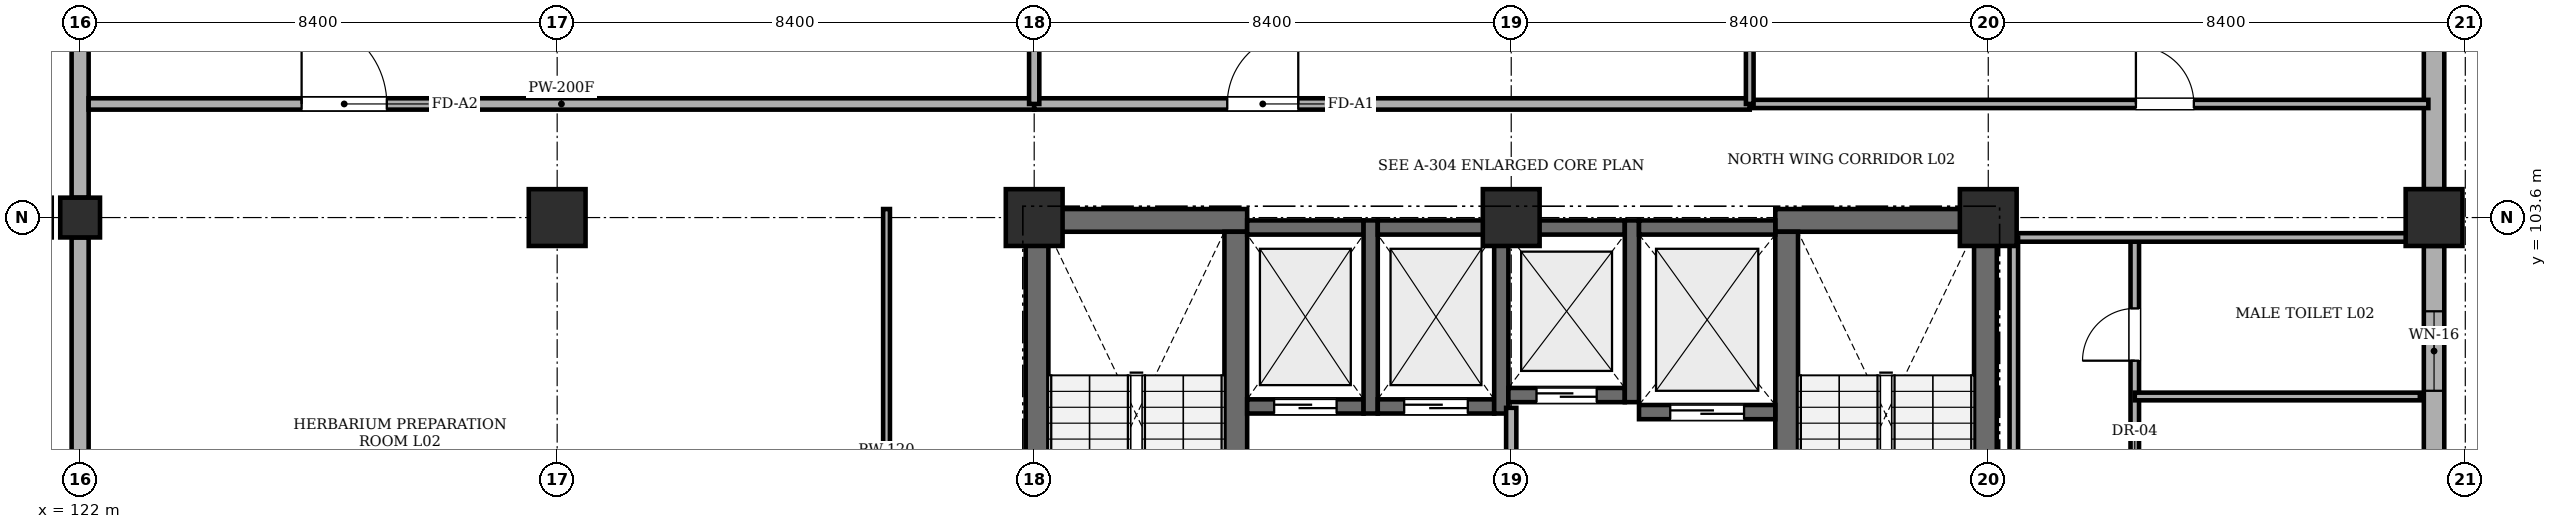
"""IFC4 building model, lengths in metres.
Left out: names, types, materials, properties, quantities, classifications, styles, units other than length and angle.
Written with IfcOpenShell. Run it as: python <this file> out.ifc"""

import sys

from ifc_helpers import new_model, si_unit, direction, frame, frame_2d, origin, origin_2d, place, context, subcontext, project, spatial, rectangle, extrude, element, fill, save


model = new_model("IFC4")
c1 = context("Model", 3, precision=1e-05, world=origin(), true_north=direction((0.0, 1.0)))
c2 = subcontext(c1, "Body", "Model", "MODEL_VIEW")
j1 = project(units=[si_unit("LENGTHUNIT", "METRE"), si_unit("PLANEANGLEUNIT", "RADIAN")], contexts=[c1])
p1 = place(None, origin())
s1 = spatial("IfcSite", under=j1, at=p1, CompositionType="ELEMENT")
p2 = place(p1, origin())
s2 = spatial("IfcBuilding", under=s1, at=p2, CompositionType="ELEMENT")
p3 = place(p2, frame((0.0, 0.0, 5.4)))
s3 = spatial("IfcBuildingStorey", under=s2, at=p3, CompositionType="ELEMENT", Elevation=5.4)
p4 = place(p3, frame((122.0, 103.6, 0.0), z_axis=(0.0, 0.0, 1.0), x_axis=(1.0, 0.0, 0.0)))
e1 = element("IfcColumn", 1, at=p4, inside=s3, PredefinedType="COLUMN", context=c2, shape_type="SweptSolid", body=[
    extrude(rectangle(XDim=0.7, YDim=0.7, at=origin_2d()), origin(), (0.0, 0.0, 1.0), 4.58),
])
for number, where, z_axis, x_axis in (
    (2, (130.4, 103.6, 0.0), (0.0, 0.0, 1.0), (1.0, 0.0, 0.0)),
    (3, (138.8, 103.6, 0.0), (0.0, 0.0, 1.0), (1.0, 0.0, 0.0)),
    (4, (147.2, 103.6, 0.0), (0.0, 0.0, 1.0), (1.0, 0.0, 0.0)),
    (5, (155.6, 103.6, 0.0), (0.0, 0.0, 1.0), (1.0, 0.0, 0.0)),
    (6, (163.45, 103.6, 0.0), (0.0, 0.0, 1.0), (1.0, 0.0, 0.0)),
):
    element("IfcColumn", number, at=place(p3, frame(where, z_axis=z_axis, x_axis=x_axis)), inside=s3, PredefinedType="COLUMN", context=c2, shape_type="SweptSolid", body=[
        extrude(rectangle(XDim=1.0, YDim=1.0, at=origin_2d()), origin(), (0.0, 0.0, 1.0), 4.58),
    ])
p5 = place(p3, frame((138.65, 103.55, 0.0), z_axis=(0.0, 0.0, 1.0), x_axis=(1.0, 0.0, 0.0)))
e7 = element("IfcWall", 7, at=p5, inside=s3, PredefinedType="SHEAR", context=c2, shape_type="SweptSolid", body=[
    extrude(rectangle(XDim=3.9, YDim=0.4, at=frame_2d((1.95, 0.0))), origin(), (0.0, 0.0, 1.0), 4.58),
])
p6 = place(p3, frame((138.85, 95.45, 0.0), z_axis=(0.0, 0.0, 1.0), x_axis=(0.0, 1.0, 0.0)))
e8 = element("IfcWall", 8, at=p6, inside=s3, PredefinedType="SHEAR", context=c2, shape_type="SweptSolid", body=[
    extrude(rectangle(XDim=7.9, YDim=0.4, at=frame_2d((3.95, 0.0))), origin(), (0.0, 0.0, 1.0), 4.58),
])
p7 = place(p3, frame((142.35, 95.45, 0.0), z_axis=(0.0, 0.0, 1.0), x_axis=(0.0, 1.0, 0.0)))
e9 = element("IfcWall", 9, at=p7, inside=s3, PredefinedType="SHEAR", context=c2, shape_type="SweptSolid", body=[
    extrude(rectangle(XDim=7.9, YDim=0.4, at=frame_2d((3.95, 0.0))), origin(), (0.0, 0.0, 1.0), 4.58),
])
p8 = place(p7, frame((0.22, 0.0, 0.0)))
e10 = element("IfcOpeningElement", 10, at=p8, cuts=e9, PredefinedType="OPENING", context=c2, shape_type="SweptSolid", body=[
    extrude(rectangle(XDim=1.15, YDim=2.15, at=frame_2d((0.575, 1.075))), frame((0.0, 0.21, 0.0), z_axis=(0.0, -1.0, 0.0), x_axis=(1.0, 0.0, 0.0)), (0.0, 0.0, 1.0), 0.42),
])
p9 = place(p3, frame((151.85, 103.55, 0.0), z_axis=(0.0, 0.0, 1.0), x_axis=(1.0, 0.0, 0.0)))
e11 = element("IfcWall", 11, at=p9, inside=s3, PredefinedType="SHEAR", context=c2, shape_type="SweptSolid", body=[
    extrude(rectangle(XDim=3.9, YDim=0.4, at=frame_2d((1.95, 0.0))), origin(), (0.0, 0.0, 1.0), 4.58),
])
p10 = place(p3, frame((152.05, 95.45, 0.0), z_axis=(0.0, 0.0, 1.0), x_axis=(0.0, 1.0, 0.0)))
e12 = element("IfcWall", 12, at=p10, inside=s3, PredefinedType="SHEAR", context=c2, shape_type="SweptSolid", body=[
    extrude(rectangle(XDim=7.9, YDim=0.4, at=frame_2d((3.95, 0.0))), origin(), (0.0, 0.0, 1.0), 4.58),
])
p11 = place(p10, frame((0.35, 0.0, 0.0)))
e13 = element("IfcOpeningElement", 13, at=p11, cuts=e12, PredefinedType="OPENING", context=c2, shape_type="SweptSolid", body=[
    extrude(rectangle(XDim=1.15, YDim=2.15, at=frame_2d((0.575, 1.075))), frame((0.0, 0.21, 0.0), z_axis=(0.0, -1.0, 0.0), x_axis=(1.0, 0.0, 0.0)), (0.0, 0.0, 1.0), 0.42),
])
p12 = place(p3, frame((155.55, 95.45, 0.0), z_axis=(0.0, 0.0, 1.0), x_axis=(0.0, 1.0, 0.0)))
e14 = element("IfcWall", 14, at=p12, inside=s3, PredefinedType="SHEAR", context=c2, shape_type="SweptSolid", body=[
    extrude(rectangle(XDim=7.9, YDim=0.4, at=frame_2d((3.95, 0.0))), origin(), (0.0, 0.0, 1.0), 4.58),
])
p13 = place(p3, frame((142.55, 100.275, 0.0), z_axis=(0.0, 0.0, 1.0), x_axis=(1.0, 0.0, 0.0)))
e15 = element("IfcWall", 15, at=p13, inside=s3, PredefinedType="SHEAR", context=c2, shape_type="SweptSolid", body=[
    extrude(rectangle(XDim=2.05, YDim=0.25, at=frame_2d((1.025, 0.0))), origin(), (0.0, 0.0, 1.0), 4.58),
])
p14 = place(p13, frame((0.475, 0.0, 0.0)))
e16 = element("IfcOpeningElement", 16, at=p14, cuts=e15, PredefinedType="OPENING", context=c2, shape_type="SweptSolid", body=[
    extrude(rectangle(XDim=1.1, YDim=2.15, at=frame_2d((0.55, 1.075))), frame((0.0, 0.135, 0.0), z_axis=(0.0, -1.0, 0.0), x_axis=(1.0, 0.0, 0.0)), (0.0, 0.0, 1.0), 0.27),
])
p15 = place(p3, frame((142.55, 103.425, 0.0), z_axis=(0.0, 0.0, 1.0), x_axis=(1.0, 0.0, 0.0)))
e17 = element("IfcWall", 17, at=p15, inside=s3, PredefinedType="SHEAR", context=c2, shape_type="SweptSolid", body=[
    extrude(rectangle(XDim=2.05, YDim=0.25, at=frame_2d((1.025, 0.0))), origin(), (0.0, 0.0, 1.0), 4.58),
])
p16 = place(p3, frame((144.725, 100.15, 0.0), z_axis=(0.0, 0.0, 1.0), x_axis=(0.0, 1.0, 0.0)))
e18 = element("IfcWall", 18, at=p16, inside=s3, PredefinedType="SHEAR", context=c2, shape_type="SweptSolid", body=[
    extrude(rectangle(XDim=3.4, YDim=0.25, at=frame_2d((1.7, 0.0))), origin(), (0.0, 0.0, 1.0), 4.58),
])
p17 = place(p3, frame((144.85, 100.275, 0.0), z_axis=(0.0, 0.0, 1.0), x_axis=(1.0, 0.0, 0.0)))
e19 = element("IfcWall", 19, at=p17, inside=s3, PredefinedType="SHEAR", context=c2, shape_type="SweptSolid", body=[
    extrude(rectangle(XDim=2.05, YDim=0.25, at=frame_2d((1.025, 0.0))), origin(), (0.0, 0.0, 1.0), 4.58),
])
p18 = place(p17, frame((0.465, 0.0, 0.0)))
e20 = element("IfcOpeningElement", 20, at=p18, cuts=e19, PredefinedType="OPENING", context=c2, shape_type="SweptSolid", body=[
    extrude(rectangle(XDim=1.12, YDim=2.15, at=frame_2d((0.56, 1.075))), frame((0.0, 0.135, 0.0), z_axis=(0.0, -1.0, 0.0), x_axis=(1.0, 0.0, 0.0)), (0.0, 0.0, 1.0), 0.27),
])
p19 = place(p3, frame((144.85, 103.425, 0.0), z_axis=(0.0, 0.0, 1.0), x_axis=(1.0, 0.0, 0.0)))
e21 = element("IfcWall", 21, at=p19, inside=s3, PredefinedType="SHEAR", context=c2, shape_type="SweptSolid", body=[
    extrude(rectangle(XDim=2.05, YDim=0.25, at=frame_2d((1.025, 0.0))), origin(), (0.0, 0.0, 1.0), 4.58),
])
p20 = place(p3, frame((147.025, 100.15, 0.0), z_axis=(0.0, 0.0, 1.0), x_axis=(0.0, 1.0, 0.0)))
e22 = element("IfcWall", 22, at=p20, inside=s3, PredefinedType="SHEAR", context=c2, shape_type="SweptSolid", body=[
    extrude(rectangle(XDim=3.4, YDim=0.25, at=frame_2d((1.7, 0.0))), origin(), (0.0, 0.0, 1.0), 4.58),
])
p21 = place(p3, frame((147.15, 100.475, 0.0), z_axis=(0.0, 0.0, 1.0), x_axis=(1.0, 0.0, 0.0)))
e23 = element("IfcWall", 23, at=p21, inside=s3, PredefinedType="SHEAR", context=c2, shape_type="SweptSolid", body=[
    extrude(rectangle(XDim=2.05, YDim=0.25, at=frame_2d((1.025, 0.0))), origin(), (0.0, 0.0, 1.0), 4.58),
])
p22 = place(p21, frame((0.495, 0.0, 0.0)))
e24 = element("IfcOpeningElement", 24, at=p22, cuts=e23, PredefinedType="OPENING", context=c2, shape_type="SweptSolid", body=[
    extrude(rectangle(XDim=1.06, YDim=2.15, at=frame_2d((0.53, 1.075))), frame((0.0, 0.135, 0.0), z_axis=(0.0, -1.0, 0.0), x_axis=(1.0, 0.0, 0.0)), (0.0, 0.0, 1.0), 0.27),
])
p23 = place(p3, frame((147.15, 103.425, 0.0), z_axis=(0.0, 0.0, 1.0), x_axis=(1.0, 0.0, 0.0)))
e25 = element("IfcWall", 25, at=p23, inside=s3, PredefinedType="SHEAR", context=c2, shape_type="SweptSolid", body=[
    extrude(rectangle(XDim=2.05, YDim=0.25, at=frame_2d((1.025, 0.0))), origin(), (0.0, 0.0, 1.0), 4.58),
])
p24 = place(p3, frame((149.325, 100.35, 0.0), z_axis=(0.0, 0.0, 1.0), x_axis=(0.0, 1.0, 0.0)))
e26 = element("IfcWall", 26, at=p24, inside=s3, PredefinedType="SHEAR", context=c2, shape_type="SweptSolid", body=[
    extrude(rectangle(XDim=3.2, YDim=0.25, at=frame_2d((1.6, 0.0))), origin(), (0.0, 0.0, 1.0), 4.58),
])
p25 = place(p3, frame((149.45, 100.175, 0.0), z_axis=(0.0, 0.0, 1.0), x_axis=(1.0, 0.0, 0.0)))
e27 = element("IfcWall", 27, at=p25, inside=s3, PredefinedType="SHEAR", context=c2, shape_type="SweptSolid", body=[
    extrude(rectangle(XDim=2.4, YDim=0.25, at=frame_2d((1.2, 0.0))), origin(), (0.0, 0.0, 1.0), 4.58),
])
p26 = place(p25, frame((0.55, 0.0, 0.0)))
e28 = element("IfcOpeningElement", 28, at=p26, cuts=e27, PredefinedType="OPENING", context=c2, shape_type="SweptSolid", body=[
    extrude(rectangle(XDim=1.3, YDim=2.25, at=frame_2d((0.65, 1.125))), frame((0.0, 0.135, 0.0), z_axis=(0.0, -1.0, 0.0), x_axis=(1.0, 0.0, 0.0)), (0.0, 0.0, 1.0), 0.27),
])
p27 = place(p3, frame((149.45, 103.425, 0.0), z_axis=(0.0, 0.0, 1.0), x_axis=(1.0, 0.0, 0.0)))
e29 = element("IfcWall", 29, at=p27, inside=s3, PredefinedType="SHEAR", context=c2, shape_type="SweptSolid", body=[
    extrude(rectangle(XDim=2.4, YDim=0.25, at=frame_2d((1.2, 0.0))), origin(), (0.0, 0.0, 1.0), 4.58),
])
p28 = place(p3, frame((163.45, 103.1, 0.0), z_axis=(0.0, 0.0, 1.0), x_axis=(0.0, -1.0, 0.0)))
e30 = element("IfcWall", 30, at=p28, inside=s3, PredefinedType="STANDARD", context=c2, shape_type="SweptSolid", body=[
    extrude(rectangle(XDim=7.4, YDim=0.36, at=frame_2d((3.7, 0.0))), origin(), (0.0, 0.0, 1.0), 3.83),
])
p29 = place(p28, frame((1.15, 0.0, 1.1)))
e31 = element("IfcOpeningElement", 31, at=p29, cuts=e30, PredefinedType="OPENING", context=c2, shape_type="SweptSolid", body=[
    extrude(rectangle(XDim=1.4, YDim=1.4, at=frame_2d((0.7, 0.7))), frame((0.0, 0.19, 0.0), z_axis=(0.0, -1.0, 0.0), x_axis=(1.0, 0.0, 0.0)), (0.0, 0.0, 1.0), 0.38),
])
p30 = place(p3, frame((163.45, 110.95, 0.0), z_axis=(0.0, 0.0, 1.0), x_axis=(0.0, -1.0, 0.0)))
e32 = element("IfcWall", 32, at=p30, inside=s3, PredefinedType="STANDARD", context=c2, shape_type="SweptSolid", body=[
    extrude(rectangle(XDim=6.85, YDim=0.36, at=frame_2d((3.425, 0.0))), origin(), (0.0, 0.0, 1.0), 3.83),
])
p31 = place(p30, frame((1.15, 0.0, 1.1)))
e33 = element("IfcOpeningElement", 33, at=p31, cuts=e32, PredefinedType="OPENING", context=c2, shape_type="SweptSolid", body=[
    extrude(rectangle(XDim=1.8, YDim=1.8, at=frame_2d((0.9, 0.9))), frame((0.0, 0.19, 0.0), z_axis=(0.0, -1.0, 0.0), x_axis=(1.0, 0.0, 0.0)), (0.0, 0.0, 1.0), 0.38),
])
p32 = place(p3, frame((122.0, 95.55, 0.0), z_axis=(0.0, 0.0, 1.0), x_axis=(0.0, 1.0, 0.0)))
e34 = element("IfcWall", 34, at=p32, inside=s3, PredefinedType="STANDARD", context=c2, shape_type="SweptSolid", body=[
    extrude(rectangle(XDim=7.7, YDim=0.3, at=frame_2d((3.85, 0.0))), origin(), (0.0, 0.0, 1.0), 3.83),
])
p33 = place(p3, frame((122.0, 103.95, 0.0), z_axis=(0.0, 0.0, 1.0), x_axis=(0.0, 1.0, 0.0)))
e35 = element("IfcWall", 35, at=p33, inside=s3, PredefinedType="STANDARD", context=c2, shape_type="SweptSolid", body=[
    extrude(rectangle(XDim=7.15, YDim=0.3, at=frame_2d((3.575, 0.0))), origin(), (0.0, 0.0, 1.0), 3.83),
])
p34 = place(p3, frame((147.2, 95.75, 0.0), z_axis=(0.0, 0.0, 1.0), x_axis=(0.0, 1.0, 0.0)))
e36 = element("IfcWall", 36, at=p34, inside=s3, PredefinedType="STANDARD", context=c2, shape_type="SweptSolid", body=[
    extrude(rectangle(XDim=4.5, YDim=0.18, at=frame_2d((2.25, 0.0))), origin(), (0.0, 0.0, 1.0), 3.83),
])
p35 = place(p3, frame((158.18, 94.68, 0.0), z_axis=(0.0, 0.0, 1.0), x_axis=(0.0, 1.0, 0.0)))
e37 = element("IfcWall", 37, at=p35, inside=s3, PredefinedType="PARTITIONING", context=c2, shape_type="SweptSolid", body=[
    extrude(rectangle(XDim=8.57, YDim=0.15, at=frame_2d((4.285, 0.0))), origin(), (0.0, 0.0, 1.0), 4.58),
])
p36 = place(p35, frame((0.8, 0.0, 0.0)))
e38 = element("IfcOpeningElement", 38, at=p36, cuts=e37, PredefinedType="OPENING", context=c2, shape_type="SweptSolid", body=[
    extrude(rectangle(XDim=1.0, YDim=2.12, at=frame_2d((0.5, 1.06))), frame((0.0, 0.085, 0.0), z_axis=(0.0, -1.0, 0.0), x_axis=(1.0, 0.0, 0.0)), (0.0, 0.0, 1.0), 0.17),
])
p37 = place(p35, frame((3.5, 0.0, 0.0)))
e39 = element("IfcOpeningElement", 39, at=p37, cuts=e37, PredefinedType="OPENING", context=c2, shape_type="SweptSolid", body=[
    extrude(rectangle(XDim=0.92, YDim=2.1, at=frame_2d((0.46, 1.05))), frame((0.0, 0.085, 0.0), z_axis=(0.0, -1.0, 0.0), x_axis=(1.0, 0.0, 0.0)), (0.0, 0.0, 1.0), 0.17),
])
p38 = place(p35, frame((6.4, 0.0, 0.0)))
e40 = element("IfcOpeningElement", 40, at=p38, cuts=e37, PredefinedType="OPENING", context=c2, shape_type="SweptSolid", body=[
    extrude(rectangle(XDim=0.92, YDim=2.1, at=frame_2d((0.46, 1.05))), frame((0.0, 0.085, 0.0), z_axis=(0.0, -1.0, 0.0), x_axis=(1.0, 0.0, 0.0)), (0.0, 0.0, 1.0), 0.17),
])
p39 = place(p3, frame((158.18, 100.45, 0.0), z_axis=(0.0, 0.0, 1.0), x_axis=(1.0, 0.0, 0.0)))
e41 = element("IfcWall", 41, at=p39, inside=s3, PredefinedType="PARTITIONING", context=c2, shape_type="SweptSolid", body=[
    extrude(rectangle(XDim=5.02, YDim=0.135, at=frame_2d((2.51, 0.0))), origin(), (0.0, 0.0, 1.0), 4.58),
])
p40 = place(p3, frame((156.05, 103.25, 0.0), z_axis=(0.0, 0.0, 1.0), x_axis=(1.0, 0.0, 0.0)))
e42 = element("IfcWall", 42, at=p40, inside=s3, PredefinedType="PARTITIONING", context=c2, shape_type="SweptSolid", body=[
    extrude(rectangle(XDim=7.15, YDim=0.15, at=frame_2d((3.575, 0.0))), origin(), (0.0, 0.0, 1.0), 4.58),
])
p41 = place(p3, frame((156.05, 94.68, 0.0), z_axis=(0.0, 0.0, 1.0), x_axis=(0.0, 1.0, 0.0)))
e43 = element("IfcWall", 43, at=p41, inside=s3, PredefinedType="PARTITIONING", context=c2, shape_type="SweptSolid", body=[
    extrude(rectangle(XDim=8.57, YDim=0.15, at=frame_2d((4.285, 0.0))), origin(), (0.0, 0.0, 1.0), 4.58),
])
p42 = place(p3, frame((136.2, 94.68, 0.0), z_axis=(0.0, 0.0, 1.0), x_axis=(0.0, 1.0, 0.0)))
e44 = element("IfcWall", 44, at=p42, inside=s3, PredefinedType="PARTITIONING", context=c2, shape_type="SweptSolid", body=[
    extrude(rectangle(XDim=9.07, YDim=0.12, at=frame_2d((4.535, 0.0))), origin(), (0.0, 0.0, 1.0), 4.58),
])
p43 = place(p3, frame((122.15, 105.6, 0.0), z_axis=(0.0, 0.0, 1.0), x_axis=(1.0, 0.0, 0.0)))
e45 = element("IfcWall", 45, at=p43, inside=s3, PredefinedType="SOLIDWALL", context=c2, shape_type="SweptSolid", body=[
    extrude(rectangle(XDim=16.65, YDim=0.2, at=frame_2d((8.325, 0.0))), origin(), (0.0, 0.0, 1.0), 4.58),
])
p44 = place(p43, frame((3.75, 0.0, 0.0)))
e46 = element("IfcOpeningElement", 46, at=p44, cuts=e45, PredefinedType="OPENING", context=c2, shape_type="SweptSolid", body=[
    extrude(rectangle(XDim=1.5, YDim=2.2, at=frame_2d((0.75, 1.1))), frame((0.0, 0.11, 0.0), z_axis=(0.0, -1.0, 0.0), x_axis=(1.0, 0.0, 0.0)), (0.0, 0.0, 1.0), 0.22),
])
p45 = place(p3, frame((138.8, 105.6, 0.0), z_axis=(0.0, 0.0, 1.0), x_axis=(1.0, 0.0, 0.0)))
e47 = element("IfcWall", 47, at=p45, inside=s3, PredefinedType="SOLIDWALL", context=c2, shape_type="SweptSolid", body=[
    extrude(rectangle(XDim=12.6, YDim=0.2, at=frame_2d((6.3, 0.0))), origin(), (0.0, 0.0, 1.0), 4.58),
])
p46 = place(p45, frame((3.4, 0.0, 0.0)))
e48 = element("IfcOpeningElement", 48, at=p46, cuts=e47, PredefinedType="OPENING", context=c2, shape_type="SweptSolid", body=[
    extrude(rectangle(XDim=1.25, YDim=2.2, at=frame_2d((0.625, 1.1))), frame((0.0, 0.11, 0.0), z_axis=(0.0, -1.0, 0.0), x_axis=(1.0, 0.0, 0.0)), (0.0, 0.0, 1.0), 0.22),
])
p47 = place(p3, frame((138.8, 105.6, 0.0), z_axis=(0.0, 0.0, 1.0), x_axis=(0.0, 1.0, 0.0)))
e49 = element("IfcWall", 49, at=p47, inside=s3, PredefinedType="STANDARD", context=c2, shape_type="SweptSolid", body=[
    extrude(rectangle(XDim=5.75, YDim=0.18, at=frame_2d((2.875, 0.0))), origin(), (0.0, 0.0, 1.0), 3.83),
])
p48 = place(p3, frame((151.4, 105.6, 0.0), z_axis=(0.0, 0.0, 1.0), x_axis=(1.0, 0.0, 0.0)))
e50 = element("IfcWall", 50, at=p48, inside=s3, PredefinedType="PARTITIONING", context=c2, shape_type="SweptSolid", body=[
    extrude(rectangle(XDim=11.95, YDim=0.145, at=frame_2d((5.975, 0.0))), origin(), (0.0, 0.0, 1.0), 4.58),
])
p49 = place(p48, frame((6.8, 0.0, 0.0)))
e51 = element("IfcOpeningElement", 51, at=p49, cuts=e50, PredefinedType="OPENING", context=c2, shape_type="SweptSolid", body=[
    extrude(rectangle(XDim=1.02, YDim=2.15, at=frame_2d((0.51, 1.075))), frame((0.0, 0.083, 0.0), z_axis=(0.0, -1.0, 0.0), x_axis=(1.0, 0.0, 0.0)), (0.0, 0.0, 1.0), 0.165),
])
p50 = place(p3, frame((151.4, 105.6, 0.0), z_axis=(0.0, 0.0, 1.0), x_axis=(0.0, 1.0, 0.0)))
e52 = element("IfcWall", 52, at=p50, inside=s3, PredefinedType="PARTITIONING", context=c2, shape_type="SweptSolid", body=[
    extrude(rectangle(XDim=5.75, YDim=0.135, at=frame_2d((2.875, 0.0))), origin(), (0.0, 0.0, 1.0), 4.03),
])
p51 = place(p29, origin())
e53 = element("IfcWindow", 53, at=p51, inside=s3, PartitioningType="SINGLE_PANEL", PredefinedType="WINDOW", context=c2, shape_type="SweptSolid", body=[
    extrude(rectangle(XDim=1.4, YDim=1.4, at=frame_2d((0.7, 0.7))), frame((0.0, 0.03, 0.0), z_axis=(0.0, -1.0, 0.0), x_axis=(1.0, 0.0, 0.0)), (0.0, 0.0, 1.0), 0.06),
])
fill(e31, e53)
p52 = place(p38, origin())
e54 = element("IfcDoor", 54, at=p52, inside=s3, OperationType="SINGLE_SWING_LEFT", PredefinedType="DOOR", context=c2, shape_type="SweptSolid", body=[
    extrude(rectangle(XDim=0.92, YDim=2.1, at=frame_2d((0.46, 1.05))), frame((0.0, 0.025, 0.0), z_axis=(0.0, -1.0, 0.0), x_axis=(1.0, 0.0, 0.0)), (0.0, 0.0, 1.0), 0.05),
])
fill(e40, e54)
p53 = place(p44, origin())
e55 = element("IfcDoor", 55, at=p53, inside=s3, OperationType="SINGLE_SWING_LEFT", PredefinedType="DOOR", context=c2, shape_type="SweptSolid", body=[
    extrude(rectangle(XDim=1.5, YDim=2.2, at=frame_2d((0.75, 1.1))), frame((0.0, 0.025, 0.0), z_axis=(0.0, -1.0, 0.0), x_axis=(1.0, 0.0, 0.0)), (0.0, 0.0, 1.0), 0.05),
])
fill(e46, e55)
p54 = place(p46, origin())
e56 = element("IfcDoor", 56, at=p54, inside=s3, OperationType="SINGLE_SWING_RIGHT", PredefinedType="DOOR", context=c2, shape_type="SweptSolid", body=[
    extrude(rectangle(XDim=1.25, YDim=2.2, at=frame_2d((0.625, 1.1))), frame((0.0, 0.025, 0.0), z_axis=(0.0, -1.0, 0.0), x_axis=(1.0, 0.0, 0.0)), (0.0, 0.0, 1.0), 0.05),
])
fill(e48, e56)
p55 = place(p49, origin())
e57 = element("IfcDoor", 57, at=p55, inside=s3, OperationType="SINGLE_SWING_LEFT", PredefinedType="DOOR", context=c2, shape_type="SweptSolid", body=[
    extrude(rectangle(XDim=1.02, YDim=2.15, at=frame_2d((0.51, 1.075))), frame((0.0, 0.025, 0.0), z_axis=(0.0, -1.0, 0.0), x_axis=(1.0, 0.0, 0.0)), (0.0, 0.0, 1.0), 0.05),
])
fill(e51, e57)
p56 = place(p14, origin())
e58 = element("IfcDoor", 58, at=p56, inside=s3, OperationType="SLIDING_TO_LEFT", PredefinedType="DOOR", context=c2, shape_type="SweptSolid", body=[
    extrude(rectangle(XDim=1.1, YDim=2.15, at=frame_2d((0.55, 1.075))), frame((0.0, 0.025, 0.0), z_axis=(0.0, -1.0, 0.0), x_axis=(1.0, 0.0, 0.0)), (0.0, 0.0, 1.0), 0.05),
])
fill(e16, e58)
p57 = place(p18, origin())
e59 = element("IfcDoor", 59, at=p57, inside=s3, OperationType="SLIDING_TO_LEFT", PredefinedType="DOOR", context=c2, shape_type="SweptSolid", body=[
    extrude(rectangle(XDim=1.12, YDim=2.15, at=frame_2d((0.56, 1.075))), frame((0.0, 0.025, 0.0), z_axis=(0.0, -1.0, 0.0), x_axis=(1.0, 0.0, 0.0)), (0.0, 0.0, 1.0), 0.05),
])
fill(e20, e59)
p58 = place(p22, origin())
e60 = element("IfcDoor", 60, at=p58, inside=s3, OperationType="SLIDING_TO_LEFT", PredefinedType="DOOR", context=c2, shape_type="SweptSolid", body=[
    extrude(rectangle(XDim=1.06, YDim=2.15, at=frame_2d((0.53, 1.075))), frame((0.0, 0.025, 0.0), z_axis=(0.0, -1.0, 0.0), x_axis=(1.0, 0.0, 0.0)), (0.0, 0.0, 1.0), 0.05),
])
fill(e24, e60)
p59 = place(p26, origin())
e61 = element("IfcDoor", 61, at=p59, inside=s3, OperationType="SLIDING_TO_LEFT", PredefinedType="DOOR", context=c2, shape_type="SweptSolid", body=[
    extrude(rectangle(XDim=1.3, YDim=2.25, at=frame_2d((0.65, 1.125))), frame((0.0, 0.025, 0.0), z_axis=(0.0, -1.0, 0.0), x_axis=(1.0, 0.0, 0.0)), (0.0, 0.0, 1.0), 0.05),
])
fill(e28, e61)
save(model, sys.argv[1])
